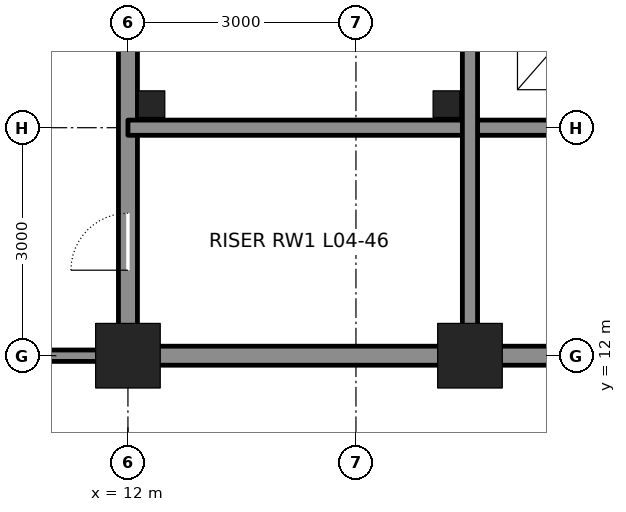
"""IFC4 building model, lengths in metres.
Left out: names, types, materials, properties, quantities, classifications, styles, units other than length and angle.
Written with IfcOpenShell. Run it as: python <this file> out.ifc"""

import sys

from ifc_helpers import new_model, si_unit, direction, frame, frame_2d, origin, origin_2d, place, context, subcontext, project, spatial, rectangle, hollow_rectangle, extrude, element, fill, save


model = new_model("IFC4")
c1 = context("Model", 3, precision=1e-05, world=origin(), true_north=direction((0.0, 1.0)))
c2 = subcontext(c1, "Body", "Model", "MODEL_VIEW")
j1 = project(units=[si_unit("LENGTHUNIT", "METRE"), si_unit("PLANEANGLEUNIT", "RADIAN")], contexts=[c1])
p1 = place(None, origin())
s1 = spatial("IfcSite", under=j1, at=p1, CompositionType="ELEMENT")
p2 = place(p1, origin())
s2 = spatial("IfcBuilding", under=s1, at=p2, CompositionType="ELEMENT")
p3 = place(p2, frame((0.0, 0.0, 24.3)))
s3 = spatial("IfcBuildingStorey", under=s2, at=p3, CompositionType="ELEMENT", Elevation=24.3)
for number, where, z_axis, x_axis in (
    (1, (12.0, 12.0, 0.0), (0.0, 0.0, 1.0), (1.0, 0.0, 0.0)),
    (2, (16.5, 12.0, 0.0), (0.0, 0.0, 1.0), (1.0, 0.0, 0.0)),
):
    element("IfcColumn", number, at=place(p3, frame(where, z_axis=z_axis, x_axis=x_axis)), inside=s3, PredefinedType="COLUMN", context=c2, shape_type="SweptSolid", body=[
        extrude(hollow_rectangle(XDim=0.85, YDim=0.85, WallThickness=0.085, at=origin_2d()), origin(), (0.0, 0.0, 1.0), 4.5),
    ])
p4 = place(p3, frame((12.0, 12.25, 0.0), z_axis=(0.0, 0.0, 1.0), x_axis=(0.0, 1.0, 0.0)))
e3 = element("IfcWall", 3, at=p4, inside=s3, PredefinedType="SOLIDWALL", context=c2, shape_type="SweptSolid", body=[
    extrude(rectangle(XDim=8.5, YDim=0.25, at=frame_2d((4.25, 0.0))), origin(), (0.0, 0.0, 1.0), 3.113),
])
p5 = place(p4, frame((0.875, 0.0, 0.0)))
e4 = element("IfcOpeningElement", 4, at=p5, cuts=e3, PredefinedType="OPENING", context=c2, shape_type="SweptSolid", body=[
    extrude(rectangle(XDim=0.75, YDim=2.1, at=frame_2d((0.375, 1.05))), frame((0.0, 0.135, 0.0), z_axis=(0.0, -1.0, 0.0), x_axis=(1.0, 0.0, 0.0)), (0.0, 0.0, 1.0), 0.27),
])
p6 = place(p3, frame((12.25, 12.0, 0.0), z_axis=(0.0, 0.0, 1.0), x_axis=(1.0, 0.0, 0.0)))
e5 = element("IfcWall", 5, at=p6, inside=s3, PredefinedType="SOLIDWALL", context=c2, shape_type="SweptSolid", body=[
    extrude(rectangle(XDim=4.0, YDim=0.25, at=frame_2d((2.0, 0.0))), origin(), (0.0, 0.0, 1.0), 3.181),
])
p7 = place(p3, frame((16.75, 12.0, 0.0), z_axis=(0.0, 0.0, 1.0), x_axis=(1.0, 0.0, 0.0)))
e6 = element("IfcWall", 6, at=p7, inside=s3, PredefinedType="SOLIDWALL", context=c2, shape_type="SweptSolid", body=[
    extrude(rectangle(XDim=2.5, YDim=0.25, at=frame_2d((1.25, 0.0))), origin(), (0.0, 0.0, 1.0), 3.181),
])
p8 = place(p3, frame((12.0, 15.0, 0.0), z_axis=(0.0, 0.0, 1.0), x_axis=(1.0, 0.0, 0.0)))
e7 = element("IfcWall", 7, at=p8, inside=s3, PredefinedType="SOLIDWALL", context=c2, shape_type="SweptSolid", body=[
    extrude(rectangle(XDim=7.5, YDim=0.2, at=frame_2d((3.75, 0.0))), origin(), (0.0, 0.0, 1.0), 4.34),
])
p9 = place(p3, frame((16.5, 12.25, 0.0), z_axis=(0.0, 0.0, 1.0), x_axis=(0.0, 1.0, 0.0)))
e8 = element("IfcWall", 8, at=p9, inside=s3, PredefinedType="SOLIDWALL", context=c2, shape_type="SweptSolid", body=[
    extrude(rectangle(XDim=8.5, YDim=0.2, at=frame_2d((4.25, 0.0))), origin(), (0.0, 0.0, 1.0), 3.413),
])
p10 = place(p3, frame((10.2, 12.0, -0.3), z_axis=(0.0, 0.0, 1.0), x_axis=(1.0, 0.0, 0.0)))
e9 = element("IfcWall", 9, at=p10, inside=s3, PredefinedType="PARTITIONING", context=c2, shape_type="SweptSolid", body=[
    extrude(rectangle(XDim=1.8, YDim=0.15, at=frame_2d((0.9, 0.0))), origin(), (0.0, 0.0, 1.0), 3.481),
])
for number, where, z_axis, x_axis in (
    (10, (12.31, 15.31, 0.0), (0.0, 0.0, 1.0), (1.0, 0.0, 0.0)),
    (11, (16.19, 15.31, 0.0), (0.0, 0.0, 1.0), (1.0, 0.0, 0.0)),
):
    element("IfcColumn", number, at=place(p3, frame(where, z_axis=z_axis, x_axis=x_axis)), inside=s3, PredefinedType="COLUMN", context=c2, shape_type="SweptSolid", body=[
        extrude(hollow_rectangle(XDim=0.35, YDim=0.35, WallThickness=0.035, at=origin_2d()), origin(), (0.0, 0.0, 1.0), 4.5),
    ])
p11 = place(p5, origin())
e12 = element("IfcDoor", 12, at=p11, inside=s3, OperationType="SINGLE_SWING_LEFT", PredefinedType="DOOR", context=c2, shape_type="SweptSolid", body=[
    extrude(rectangle(XDim=0.75, YDim=2.1, at=frame_2d((0.375, 1.05))), frame((0.0, 0.025, 0.0), z_axis=(0.0, -1.0, 0.0), x_axis=(1.0, 0.0, 0.0)), (0.0, 0.0, 1.0), 0.05),
])
fill(e4, e12)
save(model, sys.argv[1])
